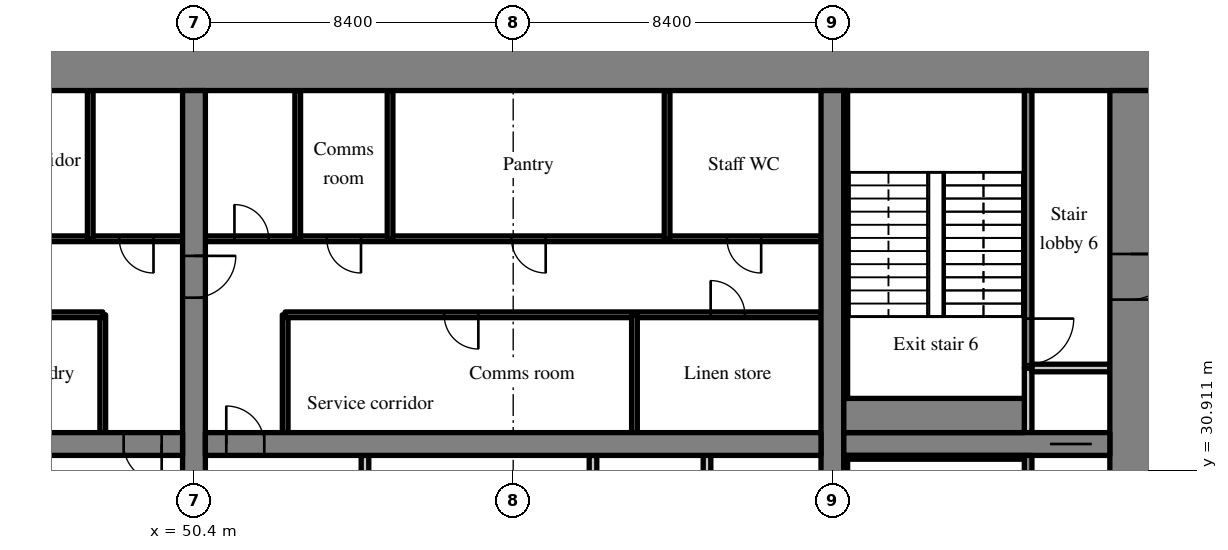
"""IFC4 building model, lengths in metres.
Left out: names, types, materials, properties, quantities, classifications, styles, units other than length and angle.
Written with IfcOpenShell. Run it as: python <this file> out.ifc"""

import sys

from ifc_helpers import new_model, si_unit, direction, frame, frame_2d, origin, place, context, subcontext, project, spatial, rectangle, extrude, source, transform, mapped, element, fill, save


model = new_model("IFC4")
c1 = context("Model", 3, precision=1e-05, world=origin(), true_north=direction((0.0, 1.0)))
c2 = subcontext(c1, "Body", "Model", "MODEL_VIEW")
j1 = project(units=[si_unit("LENGTHUNIT", "METRE"), si_unit("PLANEANGLEUNIT", "RADIAN")], contexts=[c1])
p1 = place(None, origin())
s1 = spatial("IfcSite", under=j1, at=p1, CompositionType="ELEMENT")
p2 = place(p1, origin())
s2 = spatial("IfcBuilding", under=s1, at=p2, CompositionType="ELEMENT")
p3 = place(p2, frame((0.0, 0.0, 35.4)))
s3 = spatial("IfcBuildingStorey", under=s2, at=p3, CompositionType="ELEMENT", Elevation=35.4)
m1 = source(origin(), c2, "Body", "SweptSolid", [
    extrude(rectangle(XDim=50.4, YDim=1.1, at=frame_2d((25.2, 0.0))), origin(), (0.0, 0.0, 1.0), 3.52),
])
p4 = place(p3, frame((25.2, 41.45, 0.0), z_axis=(0.0, 0.0, 1.0), x_axis=(1.0, 0.0, 0.0)))
e1 = element("IfcWall", 1, at=p4, inside=s3, PredefinedType="SHEAR", context=c2, shape_type="MappedRepresentation", body=[
    mapped(m1, transform((0.0, 0.0, 0.0), scale=1.0)),
])
m2 = source(origin(), c2, "Body", "SweptSolid", [
    extrude(rectangle(XDim=17.8, YDim=1.1, at=frame_2d((8.9, 0.0))), origin(), (0.0, 0.0, 1.0), 3.52),
])
p5 = place(p3, frame((75.05, 23.1, 0.0), z_axis=(0.0, 0.0, 1.0), x_axis=(0.0, 1.0, 0.0)))
e2 = element("IfcWall", 2, at=p5, inside=s3, PredefinedType="SHEAR", context=c2, shape_type="MappedRepresentation", body=[
    mapped(m2, transform((0.0, 0.0, 0.0), scale=1.0)),
])
m3 = source(origin(), c2, "Body", "SweptSolid", [
    extrude(rectangle(XDim=1.2, YDim=2.1, at=frame_2d((0.6, 1.05))), frame((0.0, 0.56, 0.0), z_axis=(0.0, -1.0, 0.0), x_axis=(1.0, 0.0, 0.0)), (0.0, 0.0, 1.0), 1.12),
])
p6 = place(p5, frame((12.3, 0.0, 0.0)))
e3 = element("IfcOpeningElement", 3, at=p6, cuts=e2, PredefinedType="OPENING", context=c2, shape_type="MappedRepresentation", body=[
    mapped(m3, transform((0.0, 0.0, 0.0), scale=1.0)),
])
m4 = source(origin(), c2, "Body", "SweptSolid", [
    extrude(rectangle(XDim=17.8, YDim=0.6, at=frame_2d((8.9, 0.0))), origin(), (0.0, 0.0, 1.0), 3.52),
])
p7 = place(p3, frame((50.4, 23.1, 0.0), z_axis=(0.0, 0.0, 1.0), x_axis=(0.0, 1.0, 0.0)))
e4 = element("IfcWall", 4, at=p7, inside=s3, PredefinedType="SHEAR", context=c2, shape_type="MappedRepresentation", body=[
    mapped(m4, transform((0.0, 0.0, 0.0), scale=1.0)),
])
m5 = source(origin(), c2, "Body", "SweptSolid", [
    extrude(rectangle(XDim=1.1, YDim=2.1, at=frame_2d((0.55, 1.05))), frame((0.0, 0.31, 0.0), z_axis=(0.0, -1.0, 0.0), x_axis=(1.0, 0.0, 0.0)), (0.0, 0.0, 1.0), 0.62),
])
p8 = place(p7, frame((12.35, 0.0, 0.0)))
e5 = element("IfcOpeningElement", 5, at=p8, cuts=e4, PredefinedType="OPENING", context=c2, shape_type="MappedRepresentation", body=[
    mapped(m5, transform((0.0, 0.0, 0.0), scale=1.0)),
])
p9 = place(p3, frame((67.2, 23.1, 0.0), z_axis=(0.0, 0.0, 1.0), x_axis=(0.0, 1.0, 0.0)))
e6 = element("IfcWall", 6, at=p9, inside=s3, PredefinedType="SHEAR", context=c2, shape_type="MappedRepresentation", body=[
    mapped(m4, transform((0.0, 0.0, 0.0), scale=1.0)),
])
m6 = source(origin(), c2, "Body", "SweptSolid", [
    extrude(rectangle(XDim=16.2, YDim=0.6, at=frame_2d((8.1, 0.0))), origin(), (0.0, 0.0, 1.0), 3.52),
])
p10 = place(p3, frame((33.9, 31.6, 0.0), z_axis=(0.0, 0.0, 1.0), x_axis=(1.0, 0.0, 0.0)))
e7 = element("IfcWall", 7, at=p10, inside=s3, PredefinedType="SHEAR", context=c2, shape_type="MappedRepresentation", body=[
    mapped(m6, transform((0.0, 0.0, 0.0), scale=1.0)),
])
m7 = source(origin(), c2, "Body", "SweptSolid", [
    extrude(rectangle(XDim=1.0, YDim=2.1, at=frame_2d((0.5, 1.05))), frame((0.0, 0.31, 0.0), z_axis=(0.0, -1.0, 0.0), x_axis=(1.0, 0.0, 0.0)), (0.0, 0.0, 1.0), 0.62),
])
p11 = place(p10, frame((14.65, 0.0, 0.0)))
e8 = element("IfcOpeningElement", 8, at=p11, cuts=e7, PredefinedType="OPENING", context=c2, shape_type="MappedRepresentation", body=[
    mapped(m7, transform((0.0, 0.0, 0.0), scale=1.0)),
])
m8 = source(origin(), c2, "Body", "SweptSolid", [
    extrude(rectangle(XDim=16.2, YDim=0.6, at=frame_2d((8.1, 0.0))), origin(), (0.0, 0.0, 1.0), 3.52),
])
p12 = place(p3, frame((50.7, 31.6, 0.0), z_axis=(0.0, 0.0, 1.0), x_axis=(1.0, 0.0, 0.0)))
e9 = element("IfcWall", 9, at=p12, inside=s3, PredefinedType="SHEAR", context=c2, shape_type="MappedRepresentation", body=[
    mapped(m8, transform((0.0, 0.0, 0.0), scale=1.0)),
])
p13 = place(p12, frame((0.55, 0.0, 0.0)))
e10 = element("IfcOpeningElement", 10, at=p13, cuts=e9, PredefinedType="OPENING", context=c2, shape_type="MappedRepresentation", body=[
    mapped(m7, transform((0.0, 0.0, 0.0), scale=1.0)),
])
m9 = source(origin(), c2, "Body", "SweptSolid", [
    extrude(rectangle(XDim=7.0, YDim=0.6, at=frame_2d((3.5, 0.0))), origin(), (0.0, 0.0, 1.0), 3.52),
])
p14 = place(p3, frame((67.5, 31.6, 0.0), z_axis=(0.0, 0.0, 1.0), x_axis=(1.0, 0.0, 0.0)))
e11 = element("IfcWall", 11, at=p14, inside=s3, PredefinedType="SHEAR", context=c2, shape_type="MappedRepresentation", body=[
    mapped(m9, transform((0.0, 0.0, 0.0), scale=1.0)),
])
p15 = place(p14, frame((5.425, 0.0, 0.0)))
e12 = element("IfcOpeningElement", 12, at=p15, cuts=e11, PredefinedType="OPENING", context=c2, shape_type="MappedRepresentation", body=[
    mapped(m5, transform((0.0, 0.0, 0.0), scale=1.0)),
])
m10 = source(origin(), c2, "Body", "SweptSolid", [
    extrude(rectangle(XDim=3.559, YDim=0.3, at=frame_2d((1.78, 0.0))), origin(), (0.0, 0.0, 1.0), 3.52),
])
p16 = place(p3, frame((76.523, 43.292, 0.0), z_axis=(0.0, 0.0, 1.0), x_axis=(-0.35779745313, -0.933799219604, 0.0)))
e13 = element("IfcWall", 13, at=p16, inside=s3, PredefinedType="SOLIDWALL", context=c2, shape_type="MappedRepresentation", body=[
    mapped(m10, transform((0.0, 0.0, 0.0), scale=1.0)),
])
m11 = source(origin(), c2, "Body", "SweptSolid", [
    extrude(rectangle(XDim=1.5, YDim=2.0, at=frame_2d((0.75, 1.0))), frame((0.0, 0.16, 0.0), z_axis=(0.0, -1.0, 0.0), x_axis=(1.0, 0.0, 0.0)), (0.0, 0.0, 1.0), 0.32),
])
p17 = place(p16, frame((0.156, 0.0, 0.9)))
e14 = element("IfcOpeningElement", 14, at=p17, cuts=e13, PredefinedType="OPENING", context=c2, shape_type="MappedRepresentation", body=[
    mapped(m11, transform((0.0, 0.0, 0.0), scale=1.0)),
])
m12 = source(origin(), c2, "Body", "SweptSolid", [
    extrude(rectangle(XDim=3.1, YDim=0.15, at=frame_2d((1.55, 0.0))), origin(), (0.0, 0.0, 1.0), 3.52),
])
p18 = place(p3, frame((48.0, 31.9, 0.0), z_axis=(0.0, 0.0, 1.0), x_axis=(0.0, 1.0, 0.0)))
e15 = element("IfcWall", 15, at=p18, inside=s3, PredefinedType="PARTITIONING", context=c2, shape_type="MappedRepresentation", body=[
    mapped(m12, transform((0.0, 0.0, 0.0), scale=1.0)),
])
m13 = source(origin(), c2, "Body", "SweptSolid", [
    extrude(rectangle(XDim=14.1, YDim=0.15, at=frame_2d((7.05, 0.0))), origin(), (0.0, 0.0, 1.0), 3.52),
])
p19 = place(p3, frame((33.9, 35.0, 0.0), z_axis=(0.0, 0.0, 1.0), x_axis=(1.0, 0.0, 0.0)))
e16 = element("IfcWall", 16, at=p19, inside=s3, PredefinedType="PARTITIONING", context=c2, shape_type="MappedRepresentation", body=[
    mapped(m13, transform((0.0, 0.0, 0.0), scale=1.0)),
])
m14 = source(origin(), c2, "Body", "SweptSolid", [
    extrude(rectangle(XDim=0.9, YDim=2.1, at=frame_2d((0.45, 1.05))), frame((0.0, 0.085, 0.0), z_axis=(0.0, -1.0, 0.0), x_axis=(1.0, 0.0, 0.0)), (0.0, 0.0, 1.0), 0.17),
])
p20 = place(p19, frame((0.952, 0.0, 0.0)))
e17 = element("IfcOpeningElement", 17, at=p20, cuts=e16, PredefinedType="OPENING", context=c2, shape_type="MappedRepresentation", body=[
    mapped(m14, transform((0.0, 0.0, 0.0), scale=1.0)),
])
p21 = place(p19, frame((5.861, 0.0, 0.0)))
e18 = element("IfcOpeningElement", 18, at=p21, cuts=e16, PredefinedType="OPENING", context=c2, shape_type="MappedRepresentation", body=[
    mapped(m14, transform((0.0, 0.0, 0.0), scale=1.0)),
])
p22 = place(p19, frame((11.471, 0.0, 0.0)))
e19 = element("IfcOpeningElement", 19, at=p22, cuts=e16, PredefinedType="OPENING", context=c2, shape_type="MappedRepresentation", body=[
    mapped(m14, transform((0.0, 0.0, 0.0), scale=1.0)),
])
m15 = source(origin(), c2, "Body", "SweptSolid", [
    extrude(rectangle(XDim=16.2, YDim=0.15, at=frame_2d((8.1, 0.0))), origin(), (0.0, 0.0, 1.0), 3.52),
])
p23 = place(p3, frame((33.9, 37.0, 0.0), z_axis=(0.0, 0.0, 1.0), x_axis=(1.0, 0.0, 0.0)))
e20 = element("IfcWall", 20, at=p23, inside=s3, PredefinedType="PARTITIONING", context=c2, shape_type="MappedRepresentation", body=[
    mapped(m15, transform((0.0, 0.0, 0.0), scale=1.0)),
])
p24 = place(p23, frame((6.435, 0.0, 0.0)))
e21 = element("IfcOpeningElement", 21, at=p24, cuts=e20, PredefinedType="OPENING", context=c2, shape_type="MappedRepresentation", body=[
    mapped(m14, transform((0.0, 0.0, 0.0), scale=1.0)),
])
p25 = place(p23, frame((14.535, 0.0, 0.0)))
e22 = element("IfcOpeningElement", 22, at=p25, cuts=e20, PredefinedType="OPENING", context=c2, shape_type="MappedRepresentation", body=[
    mapped(m14, transform((0.0, 0.0, 0.0), scale=1.0)),
])
m16 = source(origin(), c2, "Body", "SweptSolid", [
    extrude(rectangle(XDim=3.9, YDim=0.15, at=frame_2d((1.95, 0.0))), origin(), (0.0, 0.0, 1.0), 3.52),
])
p26 = place(p3, frame((47.67, 37.0, 0.0), z_axis=(0.0, 0.0, 1.0), x_axis=(0.0, 1.0, 0.0)))
e23 = element("IfcWall", 23, at=p26, inside=s3, PredefinedType="PARTITIONING", context=c2, shape_type="MappedRepresentation", body=[
    mapped(m16, transform((0.0, 0.0, 0.0), scale=1.0)),
])
m17 = source(origin(), c2, "Body", "SweptSolid", [
    extrude(rectangle(XDim=8.2, YDim=0.2, at=frame_2d((4.1, 0.0))), origin(), (0.0, 0.0, 1.0), 3.52),
])
for number, where, z_axis, x_axis in (
    (24, (54.9, 23.1, 0.0), (0.0, 0.0, 1.0), (0.0, 1.0, 0.0)),
    (25, (60.9, 23.1, 0.0), (0.0, 0.0, 1.0), (0.0, 1.0, 0.0)),
    (26, (63.9, 23.1, 0.0), (0.0, 0.0, 1.0), (0.0, 1.0, 0.0)),
):
    element("IfcWall", number, at=place(p3, frame(where, z_axis=z_axis, x_axis=x_axis)), inside=s3, PredefinedType="PARTITIONING", context=c2, shape_type="MappedRepresentation", body=[
        mapped(m17, transform((0.0, 0.0, 0.0), scale=1.0)),
    ])
p27 = place(p3, frame((52.8, 31.9, 0.0), z_axis=(0.0, 0.0, 1.0), x_axis=(0.0, 1.0, 0.0)))
e27 = element("IfcWall", 27, at=p27, inside=s3, PredefinedType="PARTITIONING", context=c2, shape_type="MappedRepresentation", body=[
    mapped(m12, transform((0.0, 0.0, 0.0), scale=1.0)),
])
m18 = source(origin(), c2, "Body", "SweptSolid", [
    extrude(rectangle(XDim=14.1, YDim=0.15, at=frame_2d((7.05, 0.0))), origin(), (0.0, 0.0, 1.0), 3.52),
])
p28 = place(p3, frame((66.9, 35.0, 0.0), z_axis=(0.0, 0.0, 1.0), x_axis=(-1.0, 0.0, 0.0)))
e28 = element("IfcWall", 28, at=p28, inside=s3, PredefinedType="PARTITIONING", context=c2, shape_type="MappedRepresentation", body=[
    mapped(m18, transform((0.0, 0.0, 0.0), scale=1.0)),
])
p29 = place(p28, frame((2.004, 0.0, 0.0)))
e29 = element("IfcOpeningElement", 29, at=p29, cuts=e28, PredefinedType="OPENING", context=c2, shape_type="MappedRepresentation", body=[
    mapped(m14, transform((0.0, 0.0, 0.0), scale=1.0)),
])
p30 = place(p28, frame((9.017, 0.0, 0.0)))
e30 = element("IfcOpeningElement", 30, at=p30, cuts=e28, PredefinedType="OPENING", context=c2, shape_type="MappedRepresentation", body=[
    mapped(m14, transform((0.0, 0.0, 0.0), scale=1.0)),
])
m19 = source(origin(), c2, "Body", "SweptSolid", [
    extrude(rectangle(XDim=16.2, YDim=0.15, at=frame_2d((8.1, 0.0))), origin(), (0.0, 0.0, 1.0), 3.52),
])
p31 = place(p3, frame((66.9, 37.0, 0.0), z_axis=(0.0, 0.0, 1.0), x_axis=(-1.0, 0.0, 0.0)))
e31 = element("IfcWall", 31, at=p31, inside=s3, PredefinedType="PARTITIONING", context=c2, shape_type="MappedRepresentation", body=[
    mapped(m19, transform((0.0, 0.0, 0.0), scale=1.0)),
])
p32 = place(p31, frame((1.575, 0.0, 0.0)))
e32 = element("IfcOpeningElement", 32, at=p32, cuts=e31, PredefinedType="OPENING", context=c2, shape_type="MappedRepresentation", body=[
    mapped(m14, transform((0.0, 0.0, 0.0), scale=1.0)),
])
p33 = place(p31, frame((7.245, 0.0, 0.0)))
e33 = element("IfcOpeningElement", 33, at=p33, cuts=e31, PredefinedType="OPENING", context=c2, shape_type="MappedRepresentation", body=[
    mapped(m14, transform((0.0, 0.0, 0.0), scale=1.0)),
])
p34 = place(p31, frame((12.105, 0.0, 0.0)))
e34 = element("IfcOpeningElement", 34, at=p34, cuts=e31, PredefinedType="OPENING", context=c2, shape_type="MappedRepresentation", body=[
    mapped(m14, transform((0.0, 0.0, 0.0), scale=1.0)),
])
p35 = place(p31, frame((14.535, 0.0, 0.0)))
e35 = element("IfcOpeningElement", 35, at=p35, cuts=e31, PredefinedType="OPENING", context=c2, shape_type="MappedRepresentation", body=[
    mapped(m14, transform((0.0, 0.0, 0.0), scale=1.0)),
])
p36 = place(p3, frame((61.991, 31.9, 0.0), z_axis=(0.0, 0.0, 1.0), x_axis=(0.0, 1.0, 0.0)))
e36 = element("IfcWall", 36, at=p36, inside=s3, PredefinedType="PARTITIONING", context=c2, shape_type="MappedRepresentation", body=[
    mapped(m12, transform((0.0, 0.0, 0.0), scale=1.0)),
])
for number, where, z_axis, x_axis in (
    (37, (62.85, 37.0, 0.0), (0.0, 0.0, 1.0), (0.0, 1.0, 0.0)),
    (38, (55.56, 37.0, 0.0), (0.0, 0.0, 1.0), (0.0, 1.0, 0.0)),
    (39, (53.13, 37.0, 0.0), (0.0, 0.0, 1.0), (0.0, 1.0, 0.0)),
):
    element("IfcWall", number, at=place(p3, frame(where, z_axis=z_axis, x_axis=x_axis)), inside=s3, PredefinedType="PARTITIONING", context=c2, shape_type="MappedRepresentation", body=[
        mapped(m16, transform((0.0, 0.0, 0.0), scale=1.0)),
    ])
m20 = source(origin(), c2, "Body", "SweptSolid", [
    extrude(rectangle(XDim=8.2, YDim=0.2, at=frame_2d((4.1, 0.0))), origin(), (0.0, 0.0, 1.0), 3.52),
])
p37 = place(p3, frame((72.35, 23.1, 0.0), z_axis=(0.0, 0.0, 1.0), x_axis=(0.0, 1.0, 0.0)))
e40 = element("IfcWall", 40, at=p37, inside=s3, PredefinedType="SOLIDWALL", context=c2, shape_type="MappedRepresentation", body=[
    mapped(m20, transform((0.0, 0.0, 0.0), scale=1.0)),
])
m21 = source(origin(), c2, "Body", "SweptSolid", [
    extrude(rectangle(XDim=1.2, YDim=2.1, at=frame_2d((0.6, 1.05))), frame((0.0, 0.11, 0.0), z_axis=(0.0, -1.0, 0.0), x_axis=(1.0, 0.0, 0.0)), (0.0, 0.0, 1.0), 0.22),
])
p38 = place(p37, frame((0.5, 0.0, 0.0)))
e41 = element("IfcOpeningElement", 41, at=p38, cuts=e40, PredefinedType="OPENING", context=c2, shape_type="MappedRepresentation", body=[
    mapped(m21, transform((0.0, 0.0, 0.0), scale=1.0)),
])
m22 = source(origin(), c2, "Body", "SweptSolid", [
    extrude(rectangle(XDim=1.7, YDim=0.2, at=frame_2d((0.85, 0.0))), origin(), (0.0, 0.0, 1.0), 3.52),
])
p39 = place(p3, frame((72.35, 31.9, 0.0), z_axis=(0.0, 0.0, 1.0), x_axis=(0.0, 1.0, 0.0)))
e42 = element("IfcWall", 42, at=p39, inside=s3, PredefinedType="SOLIDWALL", context=c2, shape_type="MappedRepresentation", body=[
    mapped(m22, transform((0.0, 0.0, 0.0), scale=1.0)),
])
m23 = source(origin(), c2, "Body", "SweptSolid", [
    extrude(rectangle(XDim=2.05, YDim=0.2, at=frame_2d((1.025, 0.0))), origin(), (0.0, 0.0, 1.0), 3.52),
])
p40 = place(p3, frame((72.45, 33.6, 0.0), z_axis=(0.0, 0.0, 1.0), x_axis=(1.0, 0.0, 0.0)))
e43 = element("IfcWall", 43, at=p40, inside=s3, PredefinedType="SOLIDWALL", context=c2, shape_type="MappedRepresentation", body=[
    mapped(m23, transform((0.0, 0.0, 0.0), scale=1.0)),
])
m24 = source(origin(), c2, "Body", "SweptSolid", [
    extrude(rectangle(XDim=7.3, YDim=0.2, at=frame_2d((3.65, 0.0))), origin(), (0.0, 0.0, 1.0), 3.52),
])
p41 = place(p3, frame((72.35, 33.6, 0.0), z_axis=(0.0, 0.0, 1.0), x_axis=(0.0, 1.0, 0.0)))
e44 = element("IfcWall", 44, at=p41, inside=s3, PredefinedType="SOLIDWALL", context=c2, shape_type="MappedRepresentation", body=[
    mapped(m24, transform((0.0, 0.0, 0.0), scale=1.0)),
])
p42 = place(p41, frame((0.1, 0.0, 0.0)))
e45 = element("IfcOpeningElement", 45, at=p42, cuts=e44, PredefinedType="OPENING", context=c2, shape_type="MappedRepresentation", body=[
    mapped(m21, transform((0.0, 0.0, 0.0), scale=1.0)),
])
m25 = source(origin(), c2, "Body", "SweptSolid", [
    extrude(rectangle(XDim=4.75, YDim=0.1, at=frame_2d((2.375, 0.0))), origin(), (0.0, 0.0, 1.0), 3.52),
])
p43 = place(p3, frame((67.5, 31.25, 0.0), z_axis=(0.0, 0.0, 1.0), x_axis=(1.0, 0.0, 0.0)))
e46 = element("IfcWall", 46, at=p43, inside=s3, PredefinedType="SOLIDWALL", context=c2, shape_type="MappedRepresentation", body=[
    mapped(m25, transform((0.0, 0.0, 0.0), scale=1.0)),
])
m26 = source(origin(), c2, "Body", "SweptSolid", [
    extrude(rectangle(XDim=8.1, YDim=0.1, at=frame_2d((4.05, 0.0))), origin(), (0.0, 0.0, 1.0), 3.52),
])
p44 = place(p3, frame((67.55, 23.1, 0.0), z_axis=(0.0, 0.0, 1.0), x_axis=(0.0, 1.0, 0.0)))
e47 = element("IfcWall", 47, at=p44, inside=s3, PredefinedType="SOLIDWALL", context=c2, shape_type="MappedRepresentation", body=[
    mapped(m26, transform((0.0, 0.0, 0.0), scale=1.0)),
])
m27 = source(origin(), c2, "Body", "SweptSolid", [
    extrude(rectangle(XDim=4.75, YDim=0.9, at=frame_2d((2.375, 0.0))), origin(), (0.0, 0.0, 1.0), 3.52),
])
p45 = place(p3, frame((67.5, 32.35, 0.0), z_axis=(0.0, 0.0, 1.0), x_axis=(1.0, 0.0, 0.0)))
e48 = element("IfcWall", 48, at=p45, inside=s3, PredefinedType="SOLIDWALL", context=c2, shape_type="MappedRepresentation", body=[
    mapped(m27, transform((0.0, 0.0, 0.0), scale=1.0)),
])
p46 = place(p3, frame((67.55, 32.8, 0.0), z_axis=(0.0, 0.0, 1.0), x_axis=(0.0, 1.0, 0.0)))
e49 = element("IfcWall", 49, at=p46, inside=s3, PredefinedType="SOLIDWALL", context=c2, shape_type="MappedRepresentation", body=[
    mapped(m26, transform((0.0, 0.0, 0.0), scale=1.0)),
])
m28 = source(origin(), c2, "Body", "SweptSolid", [
    extrude(rectangle(XDim=1.0, YDim=2.1, at=frame_2d((0.5, 1.05))), frame((0.0, 0.025, 0.0), z_axis=(0.0, -1.0, 0.0), x_axis=(1.0, 0.0, 0.0)), (0.0, 0.0, 1.0), 0.05),
])
p47 = place(p11, origin())
e50 = element("IfcDoor", 50, at=p47, inside=s3, OperationType="SINGLE_SWING_RIGHT", PredefinedType="DOOR", context=c2, shape_type="MappedRepresentation", body=[
    mapped(m28, transform((0.0, 0.0, 0.0), scale=1.0)),
])
fill(e8, e50)
m29 = source(origin(), c2, "Body", "SweptSolid", [
    extrude(rectangle(XDim=0.9, YDim=2.1, at=frame_2d((0.45, 1.05))), frame((0.0, 0.025, 0.0), z_axis=(0.0, -1.0, 0.0), x_axis=(1.0, 0.0, 0.0)), (0.0, 0.0, 1.0), 0.05),
])
p48 = place(p25, origin())
e51 = element("IfcDoor", 51, at=p48, inside=s3, OperationType="SINGLE_SWING_RIGHT", PredefinedType="DOOR", context=c2, shape_type="MappedRepresentation", body=[
    mapped(m29, transform((0.0, 0.0, 0.0), scale=1.0)),
])
fill(e22, e51)
p49 = place(p13, origin())
e52 = element("IfcDoor", 52, at=p49, inside=s3, OperationType="SINGLE_SWING_LEFT", PredefinedType="DOOR", context=c2, shape_type="MappedRepresentation", body=[
    mapped(m28, transform((0.0, 0.0, 0.0), scale=1.0)),
])
fill(e10, e52)
p50 = place(p29, origin())
e53 = element("IfcDoor", 53, at=p50, inside=s3, OperationType="SINGLE_SWING_RIGHT", PredefinedType="DOOR", context=c2, shape_type="MappedRepresentation", body=[
    mapped(m29, transform((0.0, 0.0, 0.0), scale=1.0)),
])
fill(e29, e53)
p51 = place(p30, origin())
e54 = element("IfcDoor", 54, at=p51, inside=s3, OperationType="SINGLE_SWING_LEFT", PredefinedType="DOOR", context=c2, shape_type="MappedRepresentation", body=[
    mapped(m29, transform((0.0, 0.0, 0.0), scale=1.0)),
])
fill(e30, e54)
p52 = place(p32, origin())
e55 = element("IfcDoor", 55, at=p52, inside=s3, OperationType="SINGLE_SWING_LEFT", PredefinedType="DOOR", context=c2, shape_type="MappedRepresentation", body=[
    mapped(m29, transform((0.0, 0.0, 0.0), scale=1.0)),
])
fill(e32, e55)
p53 = place(p33, origin())
e56 = element("IfcDoor", 56, at=p53, inside=s3, OperationType="SINGLE_SWING_LEFT", PredefinedType="DOOR", context=c2, shape_type="MappedRepresentation", body=[
    mapped(m29, transform((0.0, 0.0, 0.0), scale=1.0)),
])
fill(e33, e56)
p54 = place(p34, origin())
e57 = element("IfcDoor", 57, at=p54, inside=s3, OperationType="SINGLE_SWING_LEFT", PredefinedType="DOOR", context=c2, shape_type="MappedRepresentation", body=[
    mapped(m29, transform((0.0, 0.0, 0.0), scale=1.0)),
])
fill(e34, e57)
p55 = place(p35, origin())
e58 = element("IfcDoor", 58, at=p55, inside=s3, OperationType="SINGLE_SWING_RIGHT", PredefinedType="DOOR", context=c2, shape_type="MappedRepresentation", body=[
    mapped(m29, transform((0.0, 0.0, 0.0), scale=1.0)),
])
fill(e35, e58)
m30 = source(origin(), c2, "Body", "SweptSolid", [
    extrude(rectangle(XDim=1.1, YDim=2.1, at=frame_2d((0.55, 1.05))), frame((0.0, 0.025, 0.0), z_axis=(0.0, -1.0, 0.0), x_axis=(1.0, 0.0, 0.0)), (0.0, 0.0, 1.0), 0.05),
])
p56 = place(p15, origin())
e59 = element("IfcDoor", 59, at=p56, inside=s3, OperationType="SLIDING_TO_RIGHT", PredefinedType="DOOR", context=c2, shape_type="MappedRepresentation", body=[
    mapped(m30, transform((0.0, 0.0, 0.0), scale=1.0)),
])
fill(e12, e59)
m31 = source(origin(), c2, "Body", "SweptSolid", [
    extrude(rectangle(XDim=1.2, YDim=2.1, at=frame_2d((0.6, 1.05))), frame((0.0, 0.025, 0.0), z_axis=(0.0, -1.0, 0.0), x_axis=(1.0, 0.0, 0.0)), (0.0, 0.0, 1.0), 0.05),
])
p57 = place(p42, origin())
e60 = element("IfcDoor", 60, at=p57, inside=s3, OperationType="SINGLE_SWING_RIGHT", PredefinedType="DOOR", context=c2, shape_type="MappedRepresentation", body=[
    mapped(m31, transform((0.0, 0.0, 0.0), scale=1.0)),
])
fill(e45, e60)
p58 = place(p6, origin())
e61 = element("IfcDoor", 61, at=p58, inside=s3, OperationType="SINGLE_SWING_RIGHT", PredefinedType="DOOR", context=c2, shape_type="MappedRepresentation", body=[
    mapped(m31, transform((0.0, 0.0, 0.0), scale=1.0)),
])
fill(e3, e61)
p59 = place(p8, origin())
e62 = element("IfcDoor", 62, at=p59, inside=s3, OperationType="SINGLE_SWING_RIGHT", PredefinedType="DOOR", context=c2, shape_type="MappedRepresentation", body=[
    mapped(m30, transform((0.0, 0.0, 0.0), scale=1.0)),
])
fill(e5, e62)
save(model, sys.argv[1])
